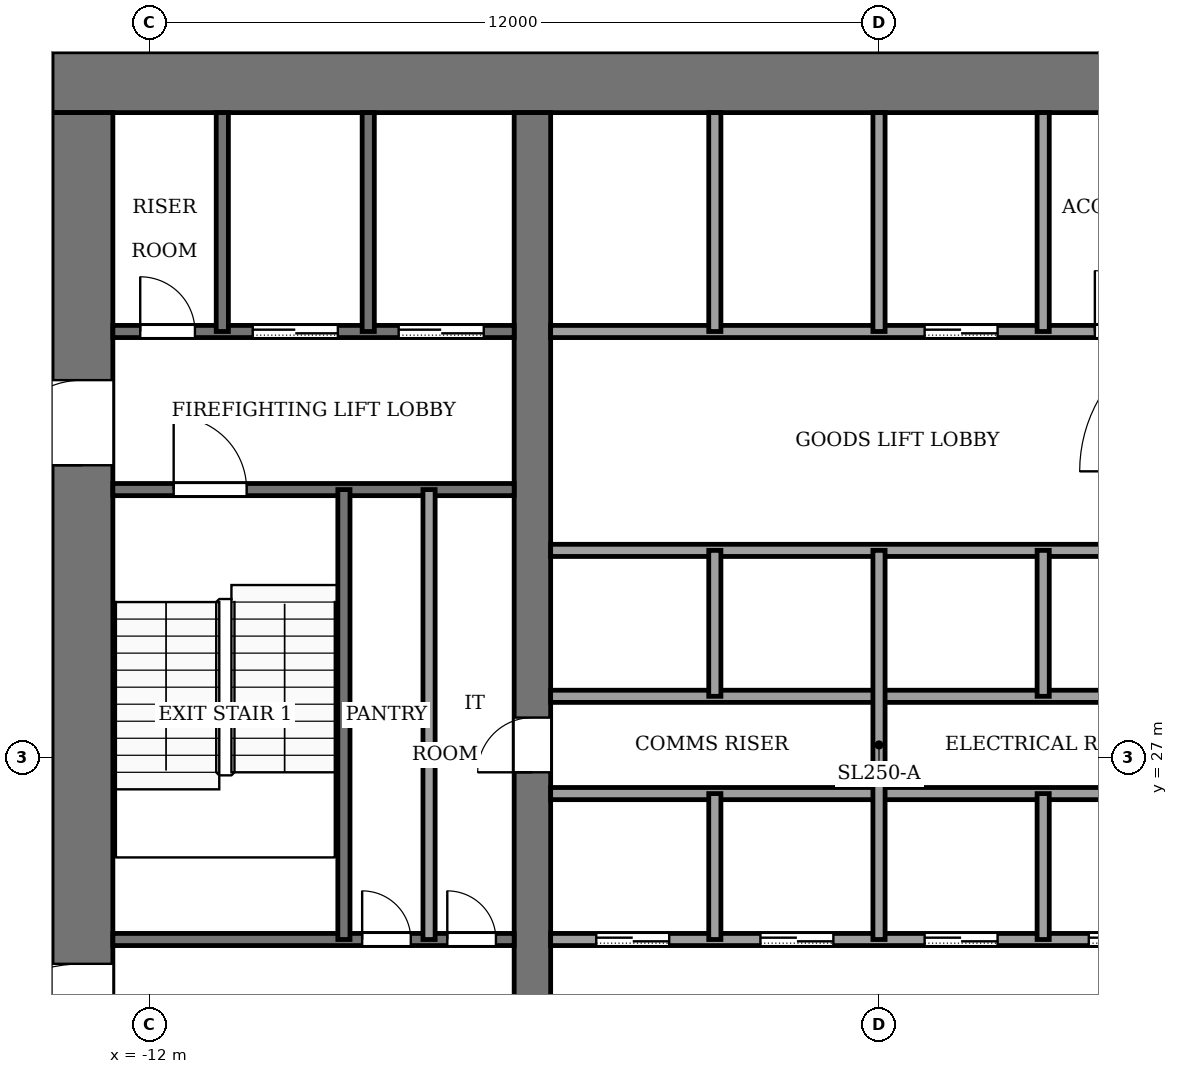
"""IFC4 building model, lengths in metres.
Left out: names, types, materials, properties, quantities, classifications, styles, units other than length and angle.
Written with IfcOpenShell. Run it as: python <this file> out.ifc"""

import sys

from ifc_helpers import new_model, si_unit, direction, frame, frame_2d, origin, place, context, subcontext, project, spatial, rectangle, extrude, element, fill, save


model = new_model("IFC4")
c1 = context("Model", 3, precision=1e-05, world=origin(), true_north=direction((0.0, 1.0)))
c2 = subcontext(c1, "Body", "Model", "MODEL_VIEW")
j1 = project(units=[si_unit("LENGTHUNIT", "METRE"), si_unit("PLANEANGLEUNIT", "RADIAN")], contexts=[c1])
p1 = place(None, origin())
s1 = spatial("IfcSite", under=j1, at=p1, CompositionType="ELEMENT")
p2 = place(p1, origin())
s2 = spatial("IfcBuilding", under=s1, at=p2, CompositionType="ELEMENT")
p3 = place(p2, frame((0.0, 0.0, 162.0)))
s3 = spatial("IfcBuildingStorey", under=s2, at=p3, CompositionType="ELEMENT", Elevation=162.0)
p4 = place(p3, frame((-13.6, 38.1, -0.13), z_axis=(0.0, 0.0, 1.0), x_axis=(1.0, 0.0, 0.0)))
e1 = element("IfcWall", 1, at=p4, inside=s3, PredefinedType="SHEAR", context=c2, shape_type="SweptSolid", body=[
    extrude(rectangle(XDim=27.2, YDim=1.0, at=frame_2d((13.6, 0.0))), origin(), (0.0, 0.0, 1.0), 4.0),
])
p5 = place(p3, frame((-13.1, 18.4, -0.13), z_axis=(0.0, 0.0, 1.0), x_axis=(0.0, 1.0, 0.0)))
e2 = element("IfcWall", 2, at=p5, inside=s3, PredefinedType="SHEAR", context=c2, shape_type="SweptSolid", body=[
    extrude(rectangle(XDim=19.2, YDim=1.0, at=frame_2d((9.6, 0.0))), origin(), (0.0, 0.0, 1.0), 4.0),
])
p6 = place(p5, frame((2.8, 0.0, 0.13)))
e3 = element("IfcOpeningElement", 3, at=p6, cuts=e2, PredefinedType="OPENING", context=c2, shape_type="SweptSolid", body=[
    extrude(rectangle(XDim=2.4, YDim=2.4, at=frame_2d((1.2, 1.2))), frame((0.0, 0.51, 0.0), z_axis=(0.0, -1.0, 0.0), x_axis=(1.0, 0.0, 0.0)), (0.0, 0.0, 1.0), 1.02),
])
p7 = place(p5, frame((13.4, 0.0, 0.13)))
e4 = element("IfcOpeningElement", 4, at=p7, cuts=e2, PredefinedType="OPENING", context=c2, shape_type="SweptSolid", body=[
    extrude(rectangle(XDim=1.4, YDim=2.2, at=frame_2d((0.7, 1.1))), frame((0.0, 0.51, 0.0), z_axis=(0.0, -1.0, 0.0), x_axis=(1.0, 0.0, 0.0)), (0.0, 0.0, 1.0), 1.02),
])
p8 = place(p3, frame((-5.7, 18.4, -0.13), z_axis=(0.0, 0.0, 1.0), x_axis=(0.0, 1.0, 0.0)))
e5 = element("IfcWall", 5, at=p8, inside=s3, PredefinedType="SHEAR", context=c2, shape_type="SweptSolid", body=[
    extrude(rectangle(XDim=19.2, YDim=0.6, at=frame_2d((9.6, 0.0))), origin(), (0.0, 0.0, 1.0), 4.0),
])
p9 = place(p8, frame((8.35, 0.0, 0.13)))
e6 = element("IfcOpeningElement", 6, at=p9, cuts=e5, PredefinedType="OPENING", context=c2, shape_type="SweptSolid", body=[
    extrude(rectangle(XDim=0.9, YDim=2.1, at=frame_2d((0.45, 1.05))), frame((0.0, 0.31, 0.0), z_axis=(0.0, -1.0, 0.0), x_axis=(1.0, 0.0, 0.0)), (0.0, 0.0, 1.0), 0.62),
])
p10 = place(p3, frame((-12.6, 24.0, 0.0), z_axis=(0.0, 0.0, 1.0), x_axis=(1.0, 0.0, 0.0)))
e7 = element("IfcWall", 7, at=p10, inside=s3, PredefinedType="PARTITIONING", context=c2, shape_type="SweptSolid", body=[
    extrude(rectangle(XDim=6.6, YDim=0.2, at=frame_2d((3.3, 0.0))), origin(), (0.0, 0.0, 1.0), 3.87),
])
p11 = place(p10, frame((4.1, 0.0, 0.0)))
e8 = element("IfcOpeningElement", 8, at=p11, cuts=e7, PredefinedType="OPENING", context=c2, shape_type="SweptSolid", body=[
    extrude(rectangle(XDim=0.8, YDim=2.1, at=frame_2d((0.4, 1.05))), frame((0.0, 0.11, 0.0), z_axis=(0.0, -1.0, 0.0), x_axis=(1.0, 0.0, 0.0)), (0.0, 0.0, 1.0), 0.22),
])
p12 = place(p10, frame((5.5, 0.0, 0.0)))
e9 = element("IfcOpeningElement", 9, at=p12, cuts=e7, PredefinedType="OPENING", context=c2, shape_type="SweptSolid", body=[
    extrude(rectangle(XDim=0.8, YDim=2.1, at=frame_2d((0.4, 1.05))), frame((0.0, 0.11, 0.0), z_axis=(0.0, -1.0, 0.0), x_axis=(1.0, 0.0, 0.0)), (0.0, 0.0, 1.0), 0.22),
])
p13 = place(p3, frame((-5.4, 24.0, 0.0), z_axis=(0.0, 0.0, 1.0), x_axis=(1.0, 0.0, 0.0)))
e10 = element("IfcWall", 10, at=p13, inside=s3, PredefinedType="PARTITIONING", context=c2, shape_type="SweptSolid", body=[
    extrude(rectangle(XDim=10.8, YDim=0.2, at=frame_2d((5.4, 0.0))), origin(), (0.0, 0.0, 1.0), 3.87),
])
p14 = place(p13, frame((0.75, 0.0, 0.0)))
e11 = element("IfcOpeningElement", 11, at=p14, cuts=e10, PredefinedType="OPENING", context=c2, shape_type="SweptSolid", body=[
    extrude(rectangle(XDim=1.2, YDim=2.2, at=frame_2d((0.6, 1.1))), frame((0.0, 0.11, 0.0), z_axis=(0.0, -1.0, 0.0), x_axis=(1.0, 0.0, 0.0)), (0.0, 0.0, 1.0), 0.22),
])
p15 = place(p13, frame((3.45, 0.0, 0.0)))
e12 = element("IfcOpeningElement", 12, at=p15, cuts=e10, PredefinedType="OPENING", context=c2, shape_type="SweptSolid", body=[
    extrude(rectangle(XDim=1.2, YDim=2.2, at=frame_2d((0.6, 1.1))), frame((0.0, 0.11, 0.0), z_axis=(0.0, -1.0, 0.0), x_axis=(1.0, 0.0, 0.0)), (0.0, 0.0, 1.0), 0.22),
])
p16 = place(p13, frame((6.15, 0.0, 0.0)))
e13 = element("IfcOpeningElement", 13, at=p16, cuts=e10, PredefinedType="OPENING", context=c2, shape_type="SweptSolid", body=[
    extrude(rectangle(XDim=1.2, YDim=2.2, at=frame_2d((0.6, 1.1))), frame((0.0, 0.11, 0.0), z_axis=(0.0, -1.0, 0.0), x_axis=(1.0, 0.0, 0.0)), (0.0, 0.0, 1.0), 0.22),
])
p17 = place(p13, frame((8.85, 0.0, 0.0)))
e14 = element("IfcOpeningElement", 14, at=p17, cuts=e10, PredefinedType="OPENING", context=c2, shape_type="SweptSolid", body=[
    extrude(rectangle(XDim=1.2, YDim=2.2, at=frame_2d((0.6, 1.1))), frame((0.0, 0.11, 0.0), z_axis=(0.0, -1.0, 0.0), x_axis=(1.0, 0.0, 0.0)), (0.0, 0.0, 1.0), 0.22),
])
for number, where, z_axis, x_axis in (
    (15, (-5.4, 26.4, 0.0), (0.0, 0.0, 1.0), (1.0, 0.0, 0.0)),
    (16, (-5.4, 28.0, 0.0), (0.0, 0.0, 1.0), (1.0, 0.0, 0.0)),
    (17, (-5.4, 30.4, 0.0), (0.0, 0.0, 1.0), (1.0, 0.0, 0.0)),
):
    element("IfcWall", number, at=place(p3, frame(where, z_axis=z_axis, x_axis=x_axis)), inside=s3, PredefinedType="PARTITIONING", context=c2, shape_type="SweptSolid", body=[
        extrude(rectangle(XDim=10.8, YDim=0.2, at=frame_2d((5.4, 0.0))), origin(), (0.0, 0.0, 1.0), 3.87),
    ])
p18 = place(p3, frame((-12.6, 31.4, 0.0), z_axis=(0.0, 0.0, 1.0), x_axis=(1.0, 0.0, 0.0)))
e18 = element("IfcWall", 18, at=p18, inside=s3, PredefinedType="PARTITIONING", context=c2, shape_type="SweptSolid", body=[
    extrude(rectangle(XDim=6.6, YDim=0.2, at=frame_2d((3.3, 0.0))), origin(), (0.0, 0.0, 1.0), 3.87),
])
p19 = place(p18, frame((1.0, 0.0, 0.0)))
e19 = element("IfcOpeningElement", 19, at=p19, cuts=e18, PredefinedType="OPENING", context=c2, shape_type="SweptSolid", body=[
    extrude(rectangle(XDim=1.2, YDim=2.2, at=frame_2d((0.6, 1.1))), frame((0.0, 0.11, 0.0), z_axis=(0.0, -1.0, 0.0), x_axis=(1.0, 0.0, 0.0)), (0.0, 0.0, 1.0), 0.22),
])
p20 = place(p3, frame((-12.6, 34.0, 0.0), z_axis=(0.0, 0.0, 1.0), x_axis=(1.0, 0.0, 0.0)))
e20 = element("IfcWall", 20, at=p20, inside=s3, PredefinedType="PARTITIONING", context=c2, shape_type="SweptSolid", body=[
    extrude(rectangle(XDim=6.6, YDim=0.2, at=frame_2d((3.3, 0.0))), origin(), (0.0, 0.0, 1.0), 3.87),
])
p21 = place(p20, frame((4.7, 0.0, 0.0)))
e21 = element("IfcOpeningElement", 21, at=p21, cuts=e20, PredefinedType="OPENING", context=c2, shape_type="SweptSolid", body=[
    extrude(rectangle(XDim=1.4, YDim=2.2, at=frame_2d((0.7, 1.1))), frame((0.0, 0.11, 0.0), z_axis=(0.0, -1.0, 0.0), x_axis=(1.0, 0.0, 0.0)), (0.0, 0.0, 1.0), 0.22),
])
p22 = place(p20, frame((2.3, 0.0, 0.0)))
e22 = element("IfcOpeningElement", 22, at=p22, cuts=e20, PredefinedType="OPENING", context=c2, shape_type="SweptSolid", body=[
    extrude(rectangle(XDim=1.4, YDim=2.2, at=frame_2d((0.7, 1.1))), frame((0.0, 0.11, 0.0), z_axis=(0.0, -1.0, 0.0), x_axis=(1.0, 0.0, 0.0)), (0.0, 0.0, 1.0), 0.22),
])
p23 = place(p20, frame((0.45, 0.0, 0.0)))
e23 = element("IfcOpeningElement", 23, at=p23, cuts=e20, PredefinedType="OPENING", context=c2, shape_type="SweptSolid", body=[
    extrude(rectangle(XDim=0.9, YDim=2.1, at=frame_2d((0.45, 1.05))), frame((0.0, 0.11, 0.0), z_axis=(0.0, -1.0, 0.0), x_axis=(1.0, 0.0, 0.0)), (0.0, 0.0, 1.0), 0.22),
])
p24 = place(p3, frame((-5.4, 34.0, 0.0), z_axis=(0.0, 0.0, 1.0), x_axis=(1.0, 0.0, 0.0)))
e24 = element("IfcWall", 24, at=p24, inside=s3, PredefinedType="PARTITIONING", context=c2, shape_type="SweptSolid", body=[
    extrude(rectangle(XDim=10.8, YDim=0.2, at=frame_2d((5.4, 0.0))), origin(), (0.0, 0.0, 1.0), 3.87),
])
p25 = place(p24, frame((6.15, 0.0, 0.0)))
e25 = element("IfcOpeningElement", 25, at=p25, cuts=e24, PredefinedType="OPENING", context=c2, shape_type="SweptSolid", body=[
    extrude(rectangle(XDim=1.2, YDim=2.2, at=frame_2d((0.6, 1.1))), frame((0.0, 0.11, 0.0), z_axis=(0.0, -1.0, 0.0), x_axis=(1.0, 0.0, 0.0)), (0.0, 0.0, 1.0), 0.22),
])
p26 = place(p24, frame((8.95, 0.0, 0.0)))
e26 = element("IfcOpeningElement", 26, at=p26, cuts=e24, PredefinedType="OPENING", context=c2, shape_type="SweptSolid", body=[
    extrude(rectangle(XDim=1.0, YDim=2.1, at=frame_2d((0.5, 1.05))), frame((0.0, 0.11, 0.0), z_axis=(0.0, -1.0, 0.0), x_axis=(1.0, 0.0, 0.0)), (0.0, 0.0, 1.0), 0.22),
])
p27 = place(p3, frame((-10.8, 34.0, 0.0), z_axis=(0.0, 0.0, 1.0), x_axis=(0.0, 1.0, 0.0)))
e27 = element("IfcWall", 27, at=p27, inside=s3, PredefinedType="PARTITIONING", context=c2, shape_type="SweptSolid", body=[
    extrude(rectangle(XDim=3.6, YDim=0.2, at=frame_2d((1.8, 0.0))), origin(), (0.0, 0.0, 1.0), 3.87),
])
p28 = place(p3, frame((-8.8, 24.0, 0.0), z_axis=(0.0, 0.0, 1.0), x_axis=(0.0, 1.0, 0.0)))
e28 = element("IfcWall", 28, at=p28, inside=s3, PredefinedType="PARTITIONING", context=c2, shape_type="SweptSolid", body=[
    extrude(rectangle(XDim=7.4, YDim=0.2, at=frame_2d((3.7, 0.0))), origin(), (0.0, 0.0, 1.0), 3.87),
])
p29 = place(p3, frame((-8.4, 34.0, 0.0), z_axis=(0.0, 0.0, 1.0), x_axis=(0.0, 1.0, 0.0)))
e29 = element("IfcWall", 29, at=p29, inside=s3, PredefinedType="PARTITIONING", context=c2, shape_type="SweptSolid", body=[
    extrude(rectangle(XDim=3.6, YDim=0.2, at=frame_2d((1.8, 0.0))), origin(), (0.0, 0.0, 1.0), 3.87),
])
p30 = place(p3, frame((-7.4, 24.0, 0.0), z_axis=(0.0, 0.0, 1.0), x_axis=(0.0, 1.0, 0.0)))
e30 = element("IfcWall", 30, at=p30, inside=s3, PredefinedType="PARTITIONING", context=c2, shape_type="SweptSolid", body=[
    extrude(rectangle(XDim=7.4, YDim=0.2, at=frame_2d((3.7, 0.0))), origin(), (0.0, 0.0, 1.0), 3.87),
])
for number, where, z_axis, x_axis in (
    (31, (-2.7, 24.0, 0.0), (0.0, 0.0, 1.0), (0.0, 1.0, 0.0)),
    (32, (-2.7, 28.0, 0.0), (0.0, 0.0, 1.0), (0.0, 1.0, 0.0)),
):
    element("IfcWall", number, at=place(p3, frame(where, z_axis=z_axis, x_axis=x_axis)), inside=s3, PredefinedType="PARTITIONING", context=c2, shape_type="SweptSolid", body=[
        extrude(rectangle(XDim=2.4, YDim=0.2, at=frame_2d((1.2, 0.0))), origin(), (0.0, 0.0, 1.0), 3.87),
    ])
p31 = place(p3, frame((-2.7, 34.0, 0.0), z_axis=(0.0, 0.0, 1.0), x_axis=(0.0, 1.0, 0.0)))
e33 = element("IfcWall", 33, at=p31, inside=s3, PredefinedType="PARTITIONING", context=c2, shape_type="SweptSolid", body=[
    extrude(rectangle(XDim=3.6, YDim=0.2, at=frame_2d((1.8, 0.0))), origin(), (0.0, 0.0, 1.0), 3.87),
])
p32 = place(p3, frame((0.0, 24.0, 0.0), z_axis=(0.0, 0.0, 1.0), x_axis=(0.0, 1.0, 0.0)))
e34 = element("IfcWall", 34, at=p32, inside=s3, PredefinedType="PARTITIONING", context=c2, shape_type="SweptSolid", body=[
    extrude(rectangle(XDim=6.4, YDim=0.2, at=frame_2d((3.2, 0.0))), origin(), (0.0, 0.0, 1.0), 3.87),
])
p33 = place(p3, frame((0.0, 34.0, 0.0), z_axis=(0.0, 0.0, 1.0), x_axis=(0.0, 1.0, 0.0)))
e35 = element("IfcWall", 35, at=p33, inside=s3, PredefinedType="PARTITIONING", context=c2, shape_type="SweptSolid", body=[
    extrude(rectangle(XDim=3.6, YDim=0.2, at=frame_2d((1.8, 0.0))), origin(), (0.0, 0.0, 1.0), 3.87),
])
for number, where, z_axis, x_axis in (
    (36, (2.7, 24.0, 0.0), (0.0, 0.0, 1.0), (0.0, 1.0, 0.0)),
    (37, (2.7, 28.0, 0.0), (0.0, 0.0, 1.0), (0.0, 1.0, 0.0)),
):
    element("IfcWall", number, at=place(p3, frame(where, z_axis=z_axis, x_axis=x_axis)), inside=s3, PredefinedType="PARTITIONING", context=c2, shape_type="SweptSolid", body=[
        extrude(rectangle(XDim=2.4, YDim=0.2, at=frame_2d((1.2, 0.0))), origin(), (0.0, 0.0, 1.0), 3.87),
    ])
p34 = place(p3, frame((2.7, 34.0, 0.0), z_axis=(0.0, 0.0, 1.0), x_axis=(0.0, 1.0, 0.0)))
e38 = element("IfcWall", 38, at=p34, inside=s3, PredefinedType="PARTITIONING", context=c2, shape_type="SweptSolid", body=[
    extrude(rectangle(XDim=3.6, YDim=0.2, at=frame_2d((1.8, 0.0))), origin(), (0.0, 0.0, 1.0), 3.87),
])
p35 = place(p14, origin())
e39 = element("IfcDoor", 39, at=p35, inside=s3, OperationType="SLIDING_TO_LEFT", PredefinedType="DOOR", context=c2, shape_type="SweptSolid", body=[
    extrude(rectangle(XDim=1.2, YDim=2.2, at=frame_2d((0.6, 1.1))), frame((0.0, 0.025, 0.0), z_axis=(0.0, -1.0, 0.0), x_axis=(1.0, 0.0, 0.0)), (0.0, 0.0, 1.0), 0.05),
])
fill(e11, e39)
p36 = place(p15, origin())
e40 = element("IfcDoor", 40, at=p36, inside=s3, OperationType="SLIDING_TO_LEFT", PredefinedType="DOOR", context=c2, shape_type="SweptSolid", body=[
    extrude(rectangle(XDim=1.2, YDim=2.2, at=frame_2d((0.6, 1.1))), frame((0.0, 0.025, 0.0), z_axis=(0.0, -1.0, 0.0), x_axis=(1.0, 0.0, 0.0)), (0.0, 0.0, 1.0), 0.05),
])
fill(e12, e40)
p37 = place(p16, origin())
e41 = element("IfcDoor", 41, at=p37, inside=s3, OperationType="SLIDING_TO_LEFT", PredefinedType="DOOR", context=c2, shape_type="SweptSolid", body=[
    extrude(rectangle(XDim=1.2, YDim=2.2, at=frame_2d((0.6, 1.1))), frame((0.0, 0.025, 0.0), z_axis=(0.0, -1.0, 0.0), x_axis=(1.0, 0.0, 0.0)), (0.0, 0.0, 1.0), 0.05),
])
fill(e13, e41)
p38 = place(p17, origin())
e42 = element("IfcDoor", 42, at=p38, inside=s3, OperationType="SLIDING_TO_LEFT", PredefinedType="DOOR", context=c2, shape_type="SweptSolid", body=[
    extrude(rectangle(XDim=1.2, YDim=2.2, at=frame_2d((0.6, 1.1))), frame((0.0, 0.025, 0.0), z_axis=(0.0, -1.0, 0.0), x_axis=(1.0, 0.0, 0.0)), (0.0, 0.0, 1.0), 0.05),
])
fill(e14, e42)
p39 = place(p25, origin())
e43 = element("IfcDoor", 43, at=p39, inside=s3, OperationType="SLIDING_TO_LEFT", PredefinedType="DOOR", context=c2, shape_type="SweptSolid", body=[
    extrude(rectangle(XDim=1.2, YDim=2.2, at=frame_2d((0.6, 1.1))), frame((0.0, 0.025, 0.0), z_axis=(0.0, -1.0, 0.0), x_axis=(1.0, 0.0, 0.0)), (0.0, 0.0, 1.0), 0.05),
])
fill(e25, e43)
p40 = place(p21, origin())
e44 = element("IfcDoor", 44, at=p40, inside=s3, OperationType="SLIDING_TO_LEFT", PredefinedType="DOOR", context=c2, shape_type="SweptSolid", body=[
    extrude(rectangle(XDim=1.4, YDim=2.2, at=frame_2d((0.7, 1.1))), frame((0.0, 0.025, 0.0), z_axis=(0.0, -1.0, 0.0), x_axis=(1.0, 0.0, 0.0)), (0.0, 0.0, 1.0), 0.05),
])
fill(e21, e44)
p41 = place(p22, origin())
e45 = element("IfcDoor", 45, at=p41, inside=s3, OperationType="SLIDING_TO_LEFT", PredefinedType="DOOR", context=c2, shape_type="SweptSolid", body=[
    extrude(rectangle(XDim=1.4, YDim=2.2, at=frame_2d((0.7, 1.1))), frame((0.0, 0.025, 0.0), z_axis=(0.0, -1.0, 0.0), x_axis=(1.0, 0.0, 0.0)), (0.0, 0.0, 1.0), 0.05),
])
fill(e22, e45)
p42 = place(p23, origin())
e46 = element("IfcDoor", 46, at=p42, inside=s3, OperationType="SINGLE_SWING_RIGHT", PredefinedType="DOOR", context=c2, shape_type="SweptSolid", body=[
    extrude(rectangle(XDim=0.9, YDim=2.1, at=frame_2d((0.45, 1.05))), frame((0.0, 0.025, 0.0), z_axis=(0.0, -1.0, 0.0), x_axis=(1.0, 0.0, 0.0)), (0.0, 0.0, 1.0), 0.05),
])
fill(e23, e46)
p43 = place(p11, origin())
e47 = element("IfcDoor", 47, at=p43, inside=s3, OperationType="SINGLE_SWING_LEFT", PredefinedType="DOOR", context=c2, shape_type="SweptSolid", body=[
    extrude(rectangle(XDim=0.8, YDim=2.1, at=frame_2d((0.4, 1.05))), frame((0.0, 0.025, 0.0), z_axis=(0.0, -1.0, 0.0), x_axis=(1.0, 0.0, 0.0)), (0.0, 0.0, 1.0), 0.05),
])
fill(e8, e47)
p44 = place(p12, origin())
e48 = element("IfcDoor", 48, at=p44, inside=s3, OperationType="SINGLE_SWING_RIGHT", PredefinedType="DOOR", context=c2, shape_type="SweptSolid", body=[
    extrude(rectangle(XDim=0.8, YDim=2.1, at=frame_2d((0.4, 1.05))), frame((0.0, 0.025, 0.0), z_axis=(0.0, -1.0, 0.0), x_axis=(1.0, 0.0, 0.0)), (0.0, 0.0, 1.0), 0.05),
])
fill(e9, e48)
p45 = place(p26, origin())
e49 = element("IfcDoor", 49, at=p45, inside=s3, OperationType="SINGLE_SWING_LEFT", PredefinedType="DOOR", context=c2, shape_type="SweptSolid", body=[
    extrude(rectangle(XDim=1.0, YDim=2.1, at=frame_2d((0.5, 1.05))), frame((0.0, 0.025, 0.0), z_axis=(0.0, -1.0, 0.0), x_axis=(1.0, 0.0, 0.0)), (0.0, 0.0, 1.0), 0.05),
])
fill(e26, e49)
p46 = place(p9, origin())
e50 = element("IfcDoor", 50, at=p46, inside=s3, OperationType="SINGLE_SWING_LEFT", PredefinedType="DOOR", context=c2, shape_type="SweptSolid", body=[
    extrude(rectangle(XDim=0.9, YDim=2.1, at=frame_2d((0.45, 1.05))), frame((0.0, 0.025, 0.0), z_axis=(0.0, -1.0, 0.0), x_axis=(1.0, 0.0, 0.0)), (0.0, 0.0, 1.0), 0.05),
])
fill(e6, e50)
p47 = place(p19, origin())
e51 = element("IfcDoor", 51, at=p47, inside=s3, OperationType="SINGLE_SWING_RIGHT", PredefinedType="DOOR", context=c2, shape_type="SweptSolid", body=[
    extrude(rectangle(XDim=1.2, YDim=2.2, at=frame_2d((0.6, 1.1))), frame((0.0, 0.025, 0.0), z_axis=(0.0, -1.0, 0.0), x_axis=(1.0, 0.0, 0.0)), (0.0, 0.0, 1.0), 0.05),
])
fill(e19, e51)
p48 = place(p6, origin())
e52 = element("IfcDoor", 52, at=p48, inside=s3, OperationType="DOUBLE_DOOR_SINGLE_SWING", PredefinedType="DOOR", context=c2, shape_type="SweptSolid", body=[
    extrude(rectangle(XDim=2.4, YDim=2.4, at=frame_2d((1.2, 1.2))), frame((0.0, 0.025, 0.0), z_axis=(0.0, -1.0, 0.0), x_axis=(1.0, 0.0, 0.0)), (0.0, 0.0, 1.0), 0.05),
])
fill(e3, e52)
p49 = place(p7, origin())
e53 = element("IfcDoor", 53, at=p49, inside=s3, OperationType="SINGLE_SWING_RIGHT", PredefinedType="DOOR", context=c2, shape_type="SweptSolid", body=[
    extrude(rectangle(XDim=1.4, YDim=2.2, at=frame_2d((0.7, 1.1))), frame((0.0, 0.025, 0.0), z_axis=(0.0, -1.0, 0.0), x_axis=(1.0, 0.0, 0.0)), (0.0, 0.0, 1.0), 0.05),
])
fill(e4, e53)
save(model, sys.argv[1])
